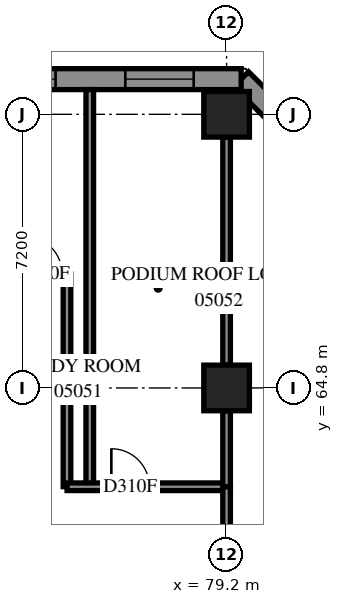
"""IFC4 building model, lengths in metres.
Left out: names, types, materials, properties, quantities, classifications, styles, units other than length and angle.
Written with IfcOpenShell. Run it as: python <this file> out.ifc"""

import sys

from ifc_helpers import new_model, si_unit, direction, frame, frame_2d, origin, origin_2d, place, context, subcontext, project, spatial, polyline, rectangle, outline, extrude, element, fill, save


model = new_model("IFC4")
c1 = context("Model", 3, precision=1e-05, world=origin(), true_north=direction((0.0, 1.0)))
c2 = subcontext(c1, "Body", "Model", "MODEL_VIEW")
j1 = project(units=[si_unit("LENGTHUNIT", "METRE"), si_unit("PLANEANGLEUNIT", "RADIAN")], contexts=[c1])
p1 = place(None, origin())
s1 = spatial("IfcSite", under=j1, at=p1, CompositionType="ELEMENT")
p2 = place(p1, origin())
s2 = spatial("IfcBuilding", under=s1, at=p2, CompositionType="ELEMENT")
p3 = place(p2, frame((0.0, 0.0, 22.8)))
s3 = spatial("IfcBuildingStorey", under=s2, at=p3, CompositionType="ELEMENT", Elevation=22.8)
for number, where, z_axis, x_axis in (
    (1, (79.2, 64.8, 0.0), (0.0, 0.0, 1.0), (1.0, 0.0, 0.0)),
    (2, (79.2, 72.0, 0.0), (0.0, 0.0, 1.0), (1.0, 0.0, 0.0)),
):
    element("IfcColumn", number, at=place(p3, frame(where, z_axis=z_axis, x_axis=x_axis)), inside=s3, PredefinedType="COLUMN", context=c2, shape_type="SweptSolid", body=[
        extrude(rectangle(XDim=1.2, YDim=1.2, at=origin_2d()), origin(), (0.0, 0.0, 1.0), 3.9),
    ])
p4 = place(p3, frame((117.843, 34.665, 0.0), z_axis=(0.0, 0.0, 1.0), x_axis=(-0.7071067812, 0.7071067812, 0.0)))
e3 = element("IfcWall", 3, at=p4, inside=s3, PredefinedType="SOLIDWALL", context=c2, shape_type="SweptSolid", body=[
    extrude(outline(polyline([(-0.275, -0.275), (54.222, -0.275), (53.994, 0.275), (0.275, 0.275), (-0.275, -0.275)])), origin(), (0.0, 0.0, 1.0), 3.9),
])
p5 = place(p4, frame((0.8, 0.0, 0.7)))
e4 = element("IfcOpeningElement", 4, at=p5, cuts=e3, PredefinedType="OPENING", context=c2, shape_type="SweptSolid", body=[
    extrude(rectangle(XDim=1.8, YDim=2.4, at=frame_2d((0.9, 1.2))), frame((0.0, 0.285, 0.0), z_axis=(0.0, -1.0, 0.0), x_axis=(1.0, 0.0, 0.0)), (0.0, 0.0, 1.0), 0.57),
])
p6 = place(p4, frame((4.225, 0.0, 0.7)))
e5 = element("IfcOpeningElement", 5, at=p6, cuts=e3, PredefinedType="OPENING", context=c2, shape_type="SweptSolid", body=[
    extrude(rectangle(XDim=1.8, YDim=2.4, at=frame_2d((0.9, 1.2))), frame((0.0, 0.285, 0.0), z_axis=(0.0, -1.0, 0.0), x_axis=(1.0, 0.0, 0.0)), (0.0, 0.0, 1.0), 0.57),
])
p7 = place(p4, frame((7.825, 0.0, 0.7)))
e6 = element("IfcOpeningElement", 6, at=p7, cuts=e3, PredefinedType="OPENING", context=c2, shape_type="SweptSolid", body=[
    extrude(rectangle(XDim=1.8, YDim=2.4, at=frame_2d((0.9, 1.2))), frame((0.0, 0.285, 0.0), z_axis=(0.0, -1.0, 0.0), x_axis=(1.0, 0.0, 0.0)), (0.0, 0.0, 1.0), 0.57),
])
p8 = place(p4, frame((11.425, 0.0, 0.7)))
e7 = element("IfcOpeningElement", 7, at=p8, cuts=e3, PredefinedType="OPENING", context=c2, shape_type="SweptSolid", body=[
    extrude(rectangle(XDim=1.8, YDim=2.4, at=frame_2d((0.9, 1.2))), frame((0.0, 0.285, 0.0), z_axis=(0.0, -1.0, 0.0), x_axis=(1.0, 0.0, 0.0)), (0.0, 0.0, 1.0), 0.57),
])
p9 = place(p4, frame((15.025, 0.0, 0.7)))
e8 = element("IfcOpeningElement", 8, at=p9, cuts=e3, PredefinedType="OPENING", context=c2, shape_type="SweptSolid", body=[
    extrude(rectangle(XDim=1.8, YDim=2.4, at=frame_2d((0.9, 1.2))), frame((0.0, 0.285, 0.0), z_axis=(0.0, -1.0, 0.0), x_axis=(1.0, 0.0, 0.0)), (0.0, 0.0, 1.0), 0.57),
])
p10 = place(p4, frame((18.625, 0.0, 0.7)))
e9 = element("IfcOpeningElement", 9, at=p10, cuts=e3, PredefinedType="OPENING", context=c2, shape_type="SweptSolid", body=[
    extrude(rectangle(XDim=1.8, YDim=2.4, at=frame_2d((0.9, 1.2))), frame((0.0, 0.285, 0.0), z_axis=(0.0, -1.0, 0.0), x_axis=(1.0, 0.0, 0.0)), (0.0, 0.0, 1.0), 0.57),
])
p11 = place(p4, frame((22.225, 0.0, 0.7)))
e10 = element("IfcOpeningElement", 10, at=p11, cuts=e3, PredefinedType="OPENING", context=c2, shape_type="SweptSolid", body=[
    extrude(rectangle(XDim=1.8, YDim=2.4, at=frame_2d((0.9, 1.2))), frame((0.0, 0.285, 0.0), z_axis=(0.0, -1.0, 0.0), x_axis=(1.0, 0.0, 0.0)), (0.0, 0.0, 1.0), 0.57),
])
p12 = place(p4, frame((25.825, 0.0, 0.7)))
e11 = element("IfcOpeningElement", 11, at=p12, cuts=e3, PredefinedType="OPENING", context=c2, shape_type="SweptSolid", body=[
    extrude(rectangle(XDim=1.8, YDim=2.4, at=frame_2d((0.9, 1.2))), frame((0.0, 0.285, 0.0), z_axis=(0.0, -1.0, 0.0), x_axis=(1.0, 0.0, 0.0)), (0.0, 0.0, 1.0), 0.57),
])
p13 = place(p4, frame((29.425, 0.0, 0.7)))
e12 = element("IfcOpeningElement", 12, at=p13, cuts=e3, PredefinedType="OPENING", context=c2, shape_type="SweptSolid", body=[
    extrude(rectangle(XDim=1.8, YDim=2.4, at=frame_2d((0.9, 1.2))), frame((0.0, 0.285, 0.0), z_axis=(0.0, -1.0, 0.0), x_axis=(1.0, 0.0, 0.0)), (0.0, 0.0, 1.0), 0.57),
])
p14 = place(p4, frame((33.025, 0.0, 0.7)))
e13 = element("IfcOpeningElement", 13, at=p14, cuts=e3, PredefinedType="OPENING", context=c2, shape_type="SweptSolid", body=[
    extrude(rectangle(XDim=1.8, YDim=2.4, at=frame_2d((0.9, 1.2))), frame((0.0, 0.285, 0.0), z_axis=(0.0, -1.0, 0.0), x_axis=(1.0, 0.0, 0.0)), (0.0, 0.0, 1.0), 0.57),
])
p15 = place(p4, frame((36.625, 0.0, 0.7)))
e14 = element("IfcOpeningElement", 14, at=p15, cuts=e3, PredefinedType="OPENING", context=c2, shape_type="SweptSolid", body=[
    extrude(rectangle(XDim=1.8, YDim=2.4, at=frame_2d((0.9, 1.2))), frame((0.0, 0.285, 0.0), z_axis=(0.0, -1.0, 0.0), x_axis=(1.0, 0.0, 0.0)), (0.0, 0.0, 1.0), 0.57),
])
p16 = place(p4, frame((40.225, 0.0, 0.7)))
e15 = element("IfcOpeningElement", 15, at=p16, cuts=e3, PredefinedType="OPENING", context=c2, shape_type="SweptSolid", body=[
    extrude(rectangle(XDim=1.8, YDim=2.4, at=frame_2d((0.9, 1.2))), frame((0.0, 0.285, 0.0), z_axis=(0.0, -1.0, 0.0), x_axis=(1.0, 0.0, 0.0)), (0.0, 0.0, 1.0), 0.57),
])
p17 = place(p4, frame((43.825, 0.0, 0.7)))
e16 = element("IfcOpeningElement", 16, at=p17, cuts=e3, PredefinedType="OPENING", context=c2, shape_type="SweptSolid", body=[
    extrude(rectangle(XDim=1.8, YDim=2.4, at=frame_2d((0.9, 1.2))), frame((0.0, 0.285, 0.0), z_axis=(0.0, -1.0, 0.0), x_axis=(1.0, 0.0, 0.0)), (0.0, 0.0, 1.0), 0.57),
])
p18 = place(p4, frame((47.425, 0.0, 0.7)))
e17 = element("IfcOpeningElement", 17, at=p18, cuts=e3, PredefinedType="OPENING", context=c2, shape_type="SweptSolid", body=[
    extrude(rectangle(XDim=1.8, YDim=2.4, at=frame_2d((0.9, 1.2))), frame((0.0, 0.285, 0.0), z_axis=(0.0, -1.0, 0.0), x_axis=(1.0, 0.0, 0.0)), (0.0, 0.0, 1.0), 0.57),
])
p19 = place(p4, frame((51.06, 0.0, 0.7)))
e18 = element("IfcOpeningElement", 18, at=p19, cuts=e3, PredefinedType="OPENING", context=c2, shape_type="SweptSolid", body=[
    extrude(rectangle(XDim=1.8, YDim=2.4, at=frame_2d((0.9, 1.2))), frame((0.0, 0.285, 0.0), z_axis=(0.0, -1.0, 0.0), x_axis=(1.0, 0.0, 0.0)), (0.0, 0.0, 1.0), 0.57),
])
p20 = place(p3, frame((79.583, 72.925, 0.0), z_axis=(0.0, 0.0, 1.0), x_axis=(-1.0, 0.0, 0.0)))
e19 = element("IfcWall", 19, at=p20, inside=s3, PredefinedType="SOLIDWALL", context=c2, shape_type="SweptSolid", body=[
    extrude(outline(polyline([(-0.114, -0.275), (79.583, -0.275), (79.033, 0.275), (0.114, 0.275), (-0.114, -0.275)])), origin(), (0.0, 0.0, 1.0), 3.9),
])
p21 = place(p20, frame((1.249, 0.0, 0.7)))
e20 = element("IfcOpeningElement", 20, at=p21, cuts=e19, PredefinedType="OPENING", context=c2, shape_type="SweptSolid", body=[
    extrude(rectangle(XDim=1.8, YDim=2.4, at=frame_2d((0.9, 1.2))), frame((0.0, 0.285, 0.0), z_axis=(0.0, -1.0, 0.0), x_axis=(1.0, 0.0, 0.0)), (0.0, 0.0, 1.0), 0.57),
])
p22 = place(p20, frame((4.883, 0.0, 0.7)))
e21 = element("IfcOpeningElement", 21, at=p22, cuts=e19, PredefinedType="OPENING", context=c2, shape_type="SweptSolid", body=[
    extrude(rectangle(XDim=1.8, YDim=2.4, at=frame_2d((0.9, 1.2))), frame((0.0, 0.285, 0.0), z_axis=(0.0, -1.0, 0.0), x_axis=(1.0, 0.0, 0.0)), (0.0, 0.0, 1.0), 0.57),
])
p23 = place(p20, frame((8.483, 0.0, 0.7)))
e22 = element("IfcOpeningElement", 22, at=p23, cuts=e19, PredefinedType="OPENING", context=c2, shape_type="SweptSolid", body=[
    extrude(rectangle(XDim=1.8, YDim=2.4, at=frame_2d((0.9, 1.2))), frame((0.0, 0.285, 0.0), z_axis=(0.0, -1.0, 0.0), x_axis=(1.0, 0.0, 0.0)), (0.0, 0.0, 1.0), 0.57),
])
p24 = place(p20, frame((12.083, 0.0, 0.7)))
e23 = element("IfcOpeningElement", 23, at=p24, cuts=e19, PredefinedType="OPENING", context=c2, shape_type="SweptSolid", body=[
    extrude(rectangle(XDim=1.8, YDim=2.4, at=frame_2d((0.9, 1.2))), frame((0.0, 0.285, 0.0), z_axis=(0.0, -1.0, 0.0), x_axis=(1.0, 0.0, 0.0)), (0.0, 0.0, 1.0), 0.57),
])
p25 = place(p20, frame((15.683, 0.0, 0.7)))
e24 = element("IfcOpeningElement", 24, at=p25, cuts=e19, PredefinedType="OPENING", context=c2, shape_type="SweptSolid", body=[
    extrude(rectangle(XDim=1.8, YDim=2.4, at=frame_2d((0.9, 1.2))), frame((0.0, 0.285, 0.0), z_axis=(0.0, -1.0, 0.0), x_axis=(1.0, 0.0, 0.0)), (0.0, 0.0, 1.0), 0.57),
])
p26 = place(p20, frame((19.283, 0.0, 0.7)))
e25 = element("IfcOpeningElement", 25, at=p26, cuts=e19, PredefinedType="OPENING", context=c2, shape_type="SweptSolid", body=[
    extrude(rectangle(XDim=1.8, YDim=2.4, at=frame_2d((0.9, 1.2))), frame((0.0, 0.285, 0.0), z_axis=(0.0, -1.0, 0.0), x_axis=(1.0, 0.0, 0.0)), (0.0, 0.0, 1.0), 0.57),
])
p27 = place(p20, frame((22.883, 0.0, 0.7)))
e26 = element("IfcOpeningElement", 26, at=p27, cuts=e19, PredefinedType="OPENING", context=c2, shape_type="SweptSolid", body=[
    extrude(rectangle(XDim=1.8, YDim=2.4, at=frame_2d((0.9, 1.2))), frame((0.0, 0.285, 0.0), z_axis=(0.0, -1.0, 0.0), x_axis=(1.0, 0.0, 0.0)), (0.0, 0.0, 1.0), 0.57),
])
p28 = place(p20, frame((26.483, 0.0, 0.7)))
e27 = element("IfcOpeningElement", 27, at=p28, cuts=e19, PredefinedType="OPENING", context=c2, shape_type="SweptSolid", body=[
    extrude(rectangle(XDim=1.8, YDim=2.4, at=frame_2d((0.9, 1.2))), frame((0.0, 0.285, 0.0), z_axis=(0.0, -1.0, 0.0), x_axis=(1.0, 0.0, 0.0)), (0.0, 0.0, 1.0), 0.57),
])
p29 = place(p20, frame((30.083, 0.0, 0.7)))
e28 = element("IfcOpeningElement", 28, at=p29, cuts=e19, PredefinedType="OPENING", context=c2, shape_type="SweptSolid", body=[
    extrude(rectangle(XDim=1.8, YDim=2.4, at=frame_2d((0.9, 1.2))), frame((0.0, 0.285, 0.0), z_axis=(0.0, -1.0, 0.0), x_axis=(1.0, 0.0, 0.0)), (0.0, 0.0, 1.0), 0.57),
])
p30 = place(p20, frame((33.683, 0.0, 0.7)))
e29 = element("IfcOpeningElement", 29, at=p30, cuts=e19, PredefinedType="OPENING", context=c2, shape_type="SweptSolid", body=[
    extrude(rectangle(XDim=1.8, YDim=2.4, at=frame_2d((0.9, 1.2))), frame((0.0, 0.285, 0.0), z_axis=(0.0, -1.0, 0.0), x_axis=(1.0, 0.0, 0.0)), (0.0, 0.0, 1.0), 0.57),
])
p31 = place(p20, frame((37.283, 0.0, 0.7)))
e30 = element("IfcOpeningElement", 30, at=p31, cuts=e19, PredefinedType="OPENING", context=c2, shape_type="SweptSolid", body=[
    extrude(rectangle(XDim=1.8, YDim=2.4, at=frame_2d((0.9, 1.2))), frame((0.0, 0.285, 0.0), z_axis=(0.0, -1.0, 0.0), x_axis=(1.0, 0.0, 0.0)), (0.0, 0.0, 1.0), 0.57),
])
p32 = place(p20, frame((40.883, 0.0, 0.7)))
e31 = element("IfcOpeningElement", 31, at=p32, cuts=e19, PredefinedType="OPENING", context=c2, shape_type="SweptSolid", body=[
    extrude(rectangle(XDim=1.8, YDim=2.4, at=frame_2d((0.9, 1.2))), frame((0.0, 0.285, 0.0), z_axis=(0.0, -1.0, 0.0), x_axis=(1.0, 0.0, 0.0)), (0.0, 0.0, 1.0), 0.57),
])
p33 = place(p20, frame((44.483, 0.0, 0.7)))
e32 = element("IfcOpeningElement", 32, at=p33, cuts=e19, PredefinedType="OPENING", context=c2, shape_type="SweptSolid", body=[
    extrude(rectangle(XDim=1.8, YDim=2.4, at=frame_2d((0.9, 1.2))), frame((0.0, 0.285, 0.0), z_axis=(0.0, -1.0, 0.0), x_axis=(1.0, 0.0, 0.0)), (0.0, 0.0, 1.0), 0.57),
])
p34 = place(p20, frame((48.083, 0.0, 0.7)))
e33 = element("IfcOpeningElement", 33, at=p34, cuts=e19, PredefinedType="OPENING", context=c2, shape_type="SweptSolid", body=[
    extrude(rectangle(XDim=1.8, YDim=2.4, at=frame_2d((0.9, 1.2))), frame((0.0, 0.285, 0.0), z_axis=(0.0, -1.0, 0.0), x_axis=(1.0, 0.0, 0.0)), (0.0, 0.0, 1.0), 0.57),
])
p35 = place(p20, frame((51.683, 0.0, 0.7)))
e34 = element("IfcOpeningElement", 34, at=p35, cuts=e19, PredefinedType="OPENING", context=c2, shape_type="SweptSolid", body=[
    extrude(rectangle(XDim=1.8, YDim=2.4, at=frame_2d((0.9, 1.2))), frame((0.0, 0.285, 0.0), z_axis=(0.0, -1.0, 0.0), x_axis=(1.0, 0.0, 0.0)), (0.0, 0.0, 1.0), 0.57),
])
p36 = place(p20, frame((55.283, 0.0, 0.7)))
e35 = element("IfcOpeningElement", 35, at=p36, cuts=e19, PredefinedType="OPENING", context=c2, shape_type="SweptSolid", body=[
    extrude(rectangle(XDim=1.8, YDim=2.4, at=frame_2d((0.9, 1.2))), frame((0.0, 0.285, 0.0), z_axis=(0.0, -1.0, 0.0), x_axis=(1.0, 0.0, 0.0)), (0.0, 0.0, 1.0), 0.57),
])
p37 = place(p20, frame((58.883, 0.0, 0.7)))
e36 = element("IfcOpeningElement", 36, at=p37, cuts=e19, PredefinedType="OPENING", context=c2, shape_type="SweptSolid", body=[
    extrude(rectangle(XDim=1.8, YDim=2.4, at=frame_2d((0.9, 1.2))), frame((0.0, 0.285, 0.0), z_axis=(0.0, -1.0, 0.0), x_axis=(1.0, 0.0, 0.0)), (0.0, 0.0, 1.0), 0.57),
])
p38 = place(p20, frame((62.483, 0.0, 0.7)))
e37 = element("IfcOpeningElement", 37, at=p38, cuts=e19, PredefinedType="OPENING", context=c2, shape_type="SweptSolid", body=[
    extrude(rectangle(XDim=1.8, YDim=2.4, at=frame_2d((0.9, 1.2))), frame((0.0, 0.285, 0.0), z_axis=(0.0, -1.0, 0.0), x_axis=(1.0, 0.0, 0.0)), (0.0, 0.0, 1.0), 0.57),
])
p39 = place(p20, frame((66.083, 0.0, 0.7)))
e38 = element("IfcOpeningElement", 38, at=p39, cuts=e19, PredefinedType="OPENING", context=c2, shape_type="SweptSolid", body=[
    extrude(rectangle(XDim=1.8, YDim=2.4, at=frame_2d((0.9, 1.2))), frame((0.0, 0.285, 0.0), z_axis=(0.0, -1.0, 0.0), x_axis=(1.0, 0.0, 0.0)), (0.0, 0.0, 1.0), 0.57),
])
p40 = place(p20, frame((69.683, 0.0, 0.7)))
e39 = element("IfcOpeningElement", 39, at=p40, cuts=e19, PredefinedType="OPENING", context=c2, shape_type="SweptSolid", body=[
    extrude(rectangle(XDim=1.8, YDim=2.4, at=frame_2d((0.9, 1.2))), frame((0.0, 0.285, 0.0), z_axis=(0.0, -1.0, 0.0), x_axis=(1.0, 0.0, 0.0)), (0.0, 0.0, 1.0), 0.57),
])
p41 = place(p20, frame((73.683, 0.0, 0.7)))
e40 = element("IfcOpeningElement", 40, at=p41, cuts=e19, PredefinedType="OPENING", context=c2, shape_type="SweptSolid", body=[
    extrude(rectangle(XDim=1.8, YDim=2.4, at=frame_2d((0.9, 1.2))), frame((0.0, 0.285, 0.0), z_axis=(0.0, -1.0, 0.0), x_axis=(1.0, 0.0, 0.0)), (0.0, 0.0, 1.0), 0.57),
])
p42 = place(p20, frame((76.508, 0.0, 0.7)))
e41 = element("IfcOpeningElement", 41, at=p42, cuts=e19, PredefinedType="OPENING", context=c2, shape_type="SweptSolid", body=[
    extrude(rectangle(XDim=1.8, YDim=2.4, at=frame_2d((0.9, 1.2))), frame((0.0, 0.285, 0.0), z_axis=(0.0, -1.0, 0.0), x_axis=(1.0, 0.0, 0.0)), (0.0, 0.0, 1.0), 0.57),
])
p43 = place(p3, frame((54.6, 67.8, 0.0), z_axis=(0.0, 0.0, 1.0), x_axis=(1.0, 0.0, 0.0)))
e42 = element("IfcWall", 42, at=p43, inside=s3, PredefinedType="PARTITIONING", context=c2, shape_type="SweptSolid", body=[
    extrude(rectangle(XDim=20.4, YDim=0.2, at=frame_2d((10.2, 0.0))), origin(), (0.0, 0.0, 1.0), 3.9),
])
p44 = place(p43, frame((19.271, 0.0, 0.0)))
e43 = element("IfcOpeningElement", 43, at=p44, cuts=e42, PredefinedType="OPENING", context=c2, shape_type="SweptSolid", body=[
    extrude(rectangle(XDim=1.0, YDim=2.1, at=frame_2d((0.5, 1.05))), frame((0.0, 0.11, 0.0), z_axis=(0.0, -1.0, 0.0), x_axis=(1.0, 0.0, 0.0)), (0.0, 0.0, 1.0), 0.22),
])
p45 = place(p43, frame((6.862, 0.0, 0.0)))
e44 = element("IfcOpeningElement", 44, at=p45, cuts=e42, PredefinedType="OPENING", context=c2, shape_type="SweptSolid", body=[
    extrude(rectangle(XDim=1.0, YDim=2.1, at=frame_2d((0.5, 1.05))), frame((0.0, 0.11, 0.0), z_axis=(0.0, -1.0, 0.0), x_axis=(1.0, 0.0, 0.0)), (0.0, 0.0, 1.0), 0.22),
])
p46 = place(p43, frame((14.062, 0.0, 0.0)))
e45 = element("IfcOpeningElement", 45, at=p46, cuts=e42, PredefinedType="OPENING", context=c2, shape_type="SweptSolid", body=[
    extrude(rectangle(XDim=1.0, YDim=2.1, at=frame_2d((0.5, 1.05))), frame((0.0, 0.11, 0.0), z_axis=(0.0, -1.0, 0.0), x_axis=(1.0, 0.0, 0.0)), (0.0, 0.0, 1.0), 0.22),
])
p47 = place(p3, frame((75.6, 62.2, 0.0), z_axis=(0.0, 0.0, 1.0), x_axis=(0.0, 1.0, 0.0)))
e46 = element("IfcWall", 46, at=p47, inside=s3, PredefinedType="PARTITIONING", context=c2, shape_type="SweptSolid", body=[
    extrude(rectangle(XDim=10.45, YDim=0.2, at=frame_2d((5.225, 0.0))), origin(), (0.0, 0.0, 1.0), 3.9),
])
p48 = place(p3, frame((79.2, 65.4, 0.0), z_axis=(0.0, 0.0, 1.0), x_axis=(0.0, 1.0, 0.0)))
e47 = element("IfcWall", 47, at=p48, inside=s3, PredefinedType="PARTITIONING", context=c2, shape_type="SweptSolid", body=[
    extrude(rectangle(XDim=6.0, YDim=0.2, at=frame_2d((3.0, 0.0))), origin(), (0.0, 0.0, 1.0), 3.9),
])
p49 = place(p3, frame((75.0, 62.202, 0.0), z_axis=(0.0, 0.0, 1.0), x_axis=(0.0, 1.0, 0.0)))
e48 = element("IfcWall", 48, at=p49, inside=s3, PredefinedType="PARTITIONING", context=c2, shape_type="SweptSolid", body=[
    extrude(rectangle(XDim=5.598, YDim=0.2, at=frame_2d((2.799, 0.0))), origin(), (0.0, 0.0, 1.0), 3.9),
])
p50 = place(p3, frame((75.002, 62.2, 0.0), z_axis=(0.0, 0.0, 1.0), x_axis=(1.0, 0.0, 0.0)))
e49 = element("IfcWall", 49, at=p50, inside=s3, PredefinedType="PARTITIONING", context=c2, shape_type="SweptSolid", body=[
    extrude(rectangle(XDim=4.198, YDim=0.2, at=frame_2d((2.099, 0.0))), origin(), (0.0, 0.0, 1.0), 3.9),
])
p51 = place(p50, frame((1.165, 0.0, 0.0)))
e50 = element("IfcOpeningElement", 50, at=p51, cuts=e49, PredefinedType="OPENING", context=c2, shape_type="SweptSolid", body=[
    extrude(rectangle(XDim=1.0, YDim=2.1, at=frame_2d((0.5, 1.05))), frame((0.0, 0.11, 0.0), z_axis=(0.0, -1.0, 0.0), x_axis=(1.0, 0.0, 0.0)), (0.0, 0.0, 1.0), 0.22),
])
for number, where, z_axis, x_axis in (
    (51, (79.2, 62.2, 0.0), (0.0, 0.0, 1.0), (0.0, 1.0, 0.0)),
    (52, (79.2, 60.2, 0.0), (0.0, 0.0, 1.0), (0.0, 1.0, 0.0)),
):
    element("IfcWall", number, at=place(p3, frame(where, z_axis=z_axis, x_axis=x_axis)), inside=s3, PredefinedType="PARTITIONING", context=c2, shape_type="SweptSolid", body=[
        extrude(rectangle(XDim=2.0, YDim=0.2, at=frame_2d((1.0, 0.0))), origin(), (0.0, 0.0, 1.0), 3.9),
    ])
p52 = place(p21, origin())
e53 = element("IfcWindow", 53, at=p52, inside=s3, PartitioningType="SINGLE_PANEL", PredefinedType="WINDOW", context=c2, shape_type="SweptSolid", body=[
    extrude(rectangle(XDim=1.8, YDim=2.4, at=frame_2d((0.9, 1.2))), frame((0.0, 0.155, 0.0), z_axis=(0.0, -1.0, 0.0), x_axis=(1.0, 0.0, 0.0)), (0.0, 0.0, 1.0), 0.06),
])
fill(e20, e53)
p53 = place(p22, origin())
e54 = element("IfcWindow", 54, at=p53, inside=s3, PartitioningType="SINGLE_PANEL", PredefinedType="WINDOW", context=c2, shape_type="SweptSolid", body=[
    extrude(rectangle(XDim=1.8, YDim=2.4, at=frame_2d((0.9, 1.2))), frame((0.0, 0.155, 0.0), z_axis=(0.0, -1.0, 0.0), x_axis=(1.0, 0.0, 0.0)), (0.0, 0.0, 1.0), 0.06),
])
fill(e21, e54)
p54 = place(p44, origin())
e55 = element("IfcDoor", 55, at=p54, inside=s3, OperationType="SINGLE_SWING_RIGHT", PredefinedType="DOOR", context=c2, shape_type="SweptSolid", body=[
    extrude(rectangle(XDim=1.0, YDim=2.1, at=frame_2d((0.5, 1.05))), frame((0.0, 0.025, 0.0), z_axis=(0.0, -1.0, 0.0), x_axis=(1.0, 0.0, 0.0)), (0.0, 0.0, 1.0), 0.05),
])
fill(e43, e55)
p55 = place(p51, origin())
e56 = element("IfcDoor", 56, at=p55, inside=s3, OperationType="SINGLE_SWING_LEFT", PredefinedType="DOOR", context=c2, shape_type="SweptSolid", body=[
    extrude(rectangle(XDim=1.0, YDim=2.1, at=frame_2d((0.5, 1.05))), frame((0.0, 0.025, 0.0), z_axis=(0.0, -1.0, 0.0), x_axis=(1.0, 0.0, 0.0)), (0.0, 0.0, 1.0), 0.05),
])
fill(e50, e56)
save(model, sys.argv[1])
